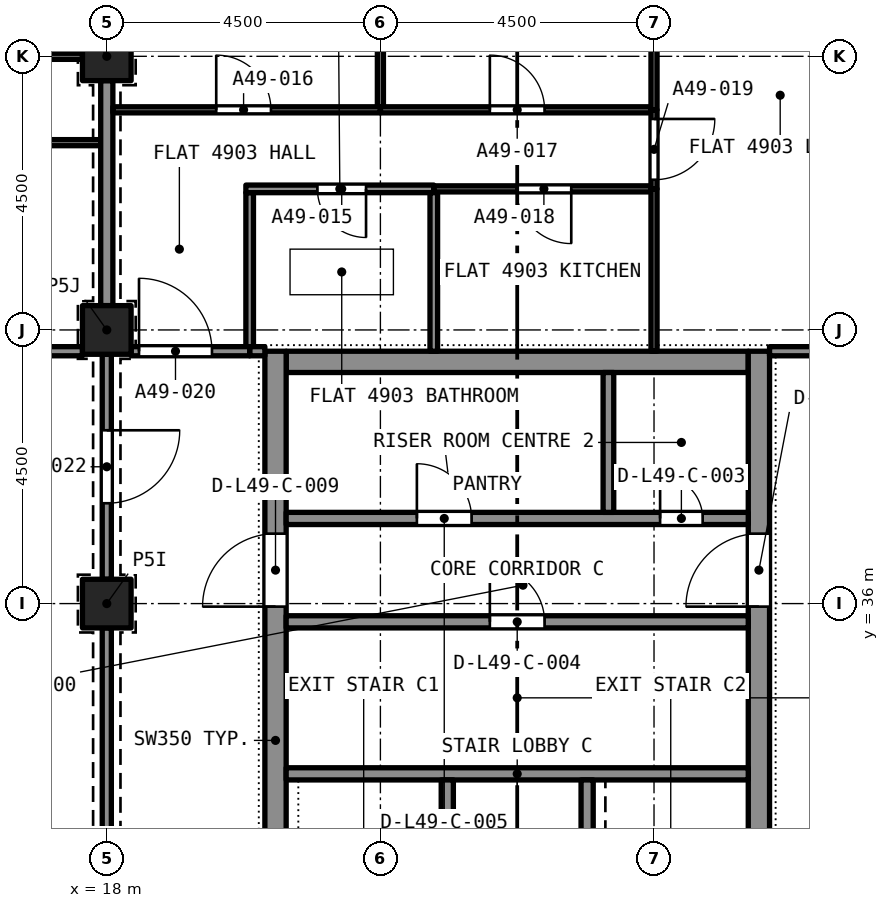
"""IFC4 building model, lengths in metres.
Left out: names, types, materials, properties, quantities, classifications, styles, units other than length and angle.
Written with IfcOpenShell. Run it as: python <this file> out.ifc"""

import sys

from ifc_helpers import new_model, si_unit, direction, frame, frame_2d, origin, origin_2d, place, context, subcontext, project, spatial, rectangle, extrude, element, fill, save


model = new_model("IFC4")
c1 = context("Model", 3, precision=1e-05, world=origin(), true_north=direction((0.0, 1.0)))
c2 = subcontext(c1, "Body", "Model", "MODEL_VIEW")
j1 = project(units=[si_unit("LENGTHUNIT", "METRE"), si_unit("PLANEANGLEUNIT", "RADIAN")], contexts=[c1])
p1 = place(None, origin())
s1 = spatial("IfcSite", under=j1, at=p1, CompositionType="ELEMENT")
p2 = place(p1, origin())
s2 = spatial("IfcBuilding", under=s1, at=p2, CompositionType="ELEMENT")
p3 = place(p2, frame((0.0, 0.0, 179.5)))
s3 = spatial("IfcBuildingStorey", under=s2, at=p3, CompositionType="ELEMENT", Elevation=179.5)
for number, where, z_axis, x_axis in (
    (1, (18.0, 36.0, 0.0), (0.0, 0.0, 1.0), (1.0, 0.0, 0.0)),
    (2, (18.0, 40.5, 0.0), (0.0, 0.0, 1.0), (1.0, 0.0, 0.0)),
    (3, (18.0, 45.0, 0.0), (0.0, 0.0, 1.0), (1.0, 0.0, 0.0)),
):
    element("IfcColumn", number, at=place(p3, frame(where, z_axis=z_axis, x_axis=x_axis)), inside=s3, PredefinedType="COLUMN", context=c2, shape_type="SweptSolid", body=[
        extrude(rectangle(XDim=0.8, YDim=0.8, at=origin_2d()), origin(), (0.0, 0.0, 1.0), 3.2),
    ])
p4 = place(p3, frame((20.95, 39.975, 0.0), z_axis=(0.0, 0.0, 1.0), x_axis=(1.0, 0.0, 0.0)))
e4 = element("IfcWall", 4, at=p4, inside=s3, PredefinedType="SOLIDWALL", context=c2, shape_type="SweptSolid", body=[
    extrude(rectangle(XDim=7.6, YDim=0.35, at=frame_2d((3.8, 0.0))), origin(), (0.0, 0.0, 1.0), 3.2),
])
p5 = place(p3, frame((20.775, 27.35, 0.0), z_axis=(0.0, 0.0, 1.0), x_axis=(0.0, 1.0, 0.0)))
e5 = element("IfcWall", 5, at=p5, inside=s3, PredefinedType="SOLIDWALL", context=c2, shape_type="SweptSolid", body=[
    extrude(rectangle(XDim=12.8, YDim=0.35, at=frame_2d((6.4, 0.0))), origin(), (0.0, 0.0, 1.0), 3.2),
])
p6 = place(p5, frame((8.6, 0.0, 0.0)))
e6 = element("IfcOpeningElement", 6, at=p6, cuts=e5, PredefinedType="OPENING", context=c2, shape_type="SweptSolid", body=[
    extrude(rectangle(XDim=1.2, YDim=2.1, at=frame_2d((0.6, 1.05))), frame((0.0, 0.185, 0.0), z_axis=(0.0, -1.0, 0.0), x_axis=(1.0, 0.0, 0.0)), (0.0, 0.0, 1.0), 0.37),
])
p7 = place(p3, frame((28.725, 27.35, 0.0), z_axis=(0.0, 0.0, 1.0), x_axis=(0.0, 1.0, 0.0)))
e7 = element("IfcWall", 7, at=p7, inside=s3, PredefinedType="SOLIDWALL", context=c2, shape_type="SweptSolid", body=[
    extrude(rectangle(XDim=12.8, YDim=0.35, at=frame_2d((6.4, 0.0))), origin(), (0.0, 0.0, 1.0), 3.2),
])
p8 = place(p7, frame((8.6, 0.0, 0.0)))
e8 = element("IfcOpeningElement", 8, at=p8, cuts=e7, PredefinedType="OPENING", context=c2, shape_type="SweptSolid", body=[
    extrude(rectangle(XDim=1.2, YDim=2.1, at=frame_2d((0.6, 1.05))), frame((0.0, 0.185, 0.0), z_axis=(0.0, -1.0, 0.0), x_axis=(1.0, 0.0, 0.0)), (0.0, 0.0, 1.0), 0.37),
])
p9 = place(p3, frame((13.5, 45.0, 0.0), z_axis=(0.0, 0.0, 1.0), x_axis=(1.0, 0.0, 0.0)))
e9 = element("IfcWall", 9, at=p9, inside=s3, PredefinedType="PARTITIONING", context=c2, shape_type="SweptSolid", body=[
    extrude(rectangle(XDim=4.1, YDim=0.1, at=frame_2d((2.05, 0.0))), origin(), (0.0, 0.0, 1.0), 2.9),
])
p10 = place(p9, frame((1.8, 0.0, 0.0)))
e10 = element("IfcOpeningElement", 10, at=p10, cuts=e9, PredefinedType="OPENING", context=c2, shape_type="SweptSolid", body=[
    extrude(rectangle(XDim=0.9, YDim=2.1, at=frame_2d((0.45, 1.05))), frame((0.0, 0.06, 0.0), z_axis=(0.0, -1.0, 0.0), x_axis=(1.0, 0.0, 0.0)), (0.0, 0.0, 1.0), 0.12),
])
p11 = place(p3, frame((17.9, 43.58, 0.0), z_axis=(0.0, 0.0, 1.0), x_axis=(-1.0, 0.0, 0.0)))
e11 = element("IfcWall", 11, at=p11, inside=s3, PredefinedType="PARTITIONING", context=c2, shape_type="SweptSolid", body=[
    extrude(rectangle(XDim=6.874, YDim=0.1, at=frame_2d((3.437, 0.0))), origin(), (0.0, 0.0, 1.0), 2.9),
])
p12 = place(p11, frame((2.937, 0.0, 0.0)))
e12 = element("IfcOpeningElement", 12, at=p12, cuts=e11, PredefinedType="OPENING", context=c2, shape_type="SweptSolid", body=[
    extrude(rectangle(XDim=0.9, YDim=2.1, at=frame_2d((0.45, 1.05))), frame((0.0, 0.06, 0.0), z_axis=(0.0, -1.0, 0.0), x_axis=(1.0, 0.0, 0.0)), (0.0, 0.0, 1.0), 0.12),
])
p13 = place(p3, frame((18.0, 40.9, 0.0), z_axis=(0.0, 0.0, 1.0), x_axis=(0.0, 1.0, 0.0)))
e13 = element("IfcWall", 13, at=p13, inside=s3, PredefinedType="PARTITIONING", context=c2, shape_type="SweptSolid", body=[
    extrude(rectangle(XDim=3.7, YDim=0.2, at=frame_2d((1.85, 0.0))), origin(), (0.0, 0.0, 1.0), 2.38),
])
p14 = place(p3, frame((13.15, 40.15, 0.0), z_axis=(0.0, 0.0, 1.0), x_axis=(1.0, 0.0, 0.0)))
e14 = element("IfcWall", 14, at=p14, inside=s3, PredefinedType="PARTITIONING", context=c2, shape_type="SweptSolid", body=[
    extrude(rectangle(XDim=4.45, YDim=0.15, at=frame_2d((2.225, 0.0))), origin(), (0.0, 0.0, 1.0), 2.9),
])
p15 = place(p3, frame((20.35, 40.225, 0.0), z_axis=(0.0, 0.0, 1.0), x_axis=(0.0, 1.0, 0.0)))
e15 = element("IfcWall", 15, at=p15, inside=s3, PredefinedType="PARTITIONING", context=c2, shape_type="SweptSolid", body=[
    extrude(rectangle(XDim=2.532, YDim=0.125, at=frame_2d((1.266, 0.0))), origin(), (0.0, 0.0, 1.0), 2.75),
])
p16 = place(p3, frame((23.378, 42.82, 0.0), z_axis=(0.0, 0.0, 1.0), x_axis=(-1.0, 0.0, 0.0)))
e16 = element("IfcWall", 16, at=p16, inside=s3, PredefinedType="PARTITIONING", context=c2, shape_type="SweptSolid", body=[
    extrude(rectangle(XDim=3.09, YDim=0.125, at=frame_2d((1.545, 0.0))), origin(), (0.0, 0.0, 1.0), 2.75),
])
p17 = place(p16, frame((1.114, 0.0, 0.0)))
e17 = element("IfcOpeningElement", 17, at=p17, cuts=e16, PredefinedType="OPENING", context=c2, shape_type="SweptSolid", body=[
    extrude(rectangle(XDim=0.8, YDim=2.1, at=frame_2d((0.4, 1.05))), frame((0.0, 0.073, 0.0), z_axis=(0.0, -1.0, 0.0), x_axis=(1.0, 0.0, 0.0)), (0.0, 0.0, 1.0), 0.145),
])
p18 = place(p3, frame((23.378, 40.15, 0.0), z_axis=(0.0, 0.0, 1.0), x_axis=(0.0, 1.0, 0.0)))
e18 = element("IfcWall", 18, at=p18, inside=s3, PredefinedType="PARTITIONING", context=c2, shape_type="SweptSolid", body=[
    extrude(rectangle(XDim=2.608, YDim=0.125, at=frame_2d((1.304, 0.0))), origin(), (0.0, 0.0, 1.0), 2.75),
])
p19 = place(p3, frame((20.35, 40.15, 0.0), z_axis=(0.0, 0.0, 1.0), x_axis=(1.0, 0.0, 0.0)))
e19 = element("IfcWall", 19, at=p19, inside=s3, PredefinedType="PARTITIONING", context=c2, shape_type="SweptSolid", body=[
    extrude(rectangle(XDim=0.25, YDim=0.15, at=frame_2d((0.125, 0.0))), origin(), (0.0, 0.0, 1.0), 2.75),
])
p20 = place(p3, frame((22.5, 44.17, 0.0), z_axis=(0.0, 0.0, 1.0), x_axis=(0.0, 1.0, 0.0)))
e20 = element("IfcWall", 20, at=p20, inside=s3, PredefinedType="PARTITIONING", context=c2, shape_type="SweptSolid", body=[
    extrude(rectangle(XDim=4.93, YDim=0.1, at=frame_2d((2.465, 0.0))), origin(), (0.0, 0.0, 1.0), 2.75),
])
p21 = place(p3, frame((18.1, 44.12, 0.0), z_axis=(0.0, 0.0, 1.0), x_axis=(1.0, 0.0, 0.0)))
e21 = element("IfcWall", 21, at=p21, inside=s3, PredefinedType="PARTITIONING", context=c2, shape_type="SweptSolid", body=[
    extrude(rectangle(XDim=4.4, YDim=0.1, at=frame_2d((2.2, 0.0))), origin(), (0.0, 0.0, 1.0), 2.75),
])
p22 = place(p21, frame((1.7, 0.0, 0.0)))
e22 = element("IfcOpeningElement", 22, at=p22, cuts=e21, PredefinedType="OPENING", context=c2, shape_type="SweptSolid", body=[
    extrude(rectangle(XDim=0.9, YDim=2.1, at=frame_2d((0.45, 1.05))), frame((0.0, 0.06, 0.0), z_axis=(0.0, -1.0, 0.0), x_axis=(1.0, 0.0, 0.0)), (0.0, 0.0, 1.0), 0.12),
])
p23 = place(p3, frame((22.5, 44.12, 0.0), z_axis=(0.0, 0.0, 1.0), x_axis=(1.0, 0.0, 0.0)))
e23 = element("IfcWall", 23, at=p23, inside=s3, PredefinedType="PARTITIONING", context=c2, shape_type="SweptSolid", body=[
    extrude(rectangle(XDim=4.45, YDim=0.1, at=frame_2d((2.225, 0.0))), origin(), (0.0, 0.0, 1.0), 2.75),
])
p24 = place(p23, frame((1.8, 0.0, 0.0)))
e24 = element("IfcOpeningElement", 24, at=p24, cuts=e23, PredefinedType="OPENING", context=c2, shape_type="SweptSolid", body=[
    extrude(rectangle(XDim=0.9, YDim=2.1, at=frame_2d((0.45, 1.05))), frame((0.0, 0.06, 0.0), z_axis=(0.0, -1.0, 0.0), x_axis=(1.0, 0.0, 0.0)), (0.0, 0.0, 1.0), 0.12),
])
p25 = place(p3, frame((27.0, 44.12, 0.0), z_axis=(0.0, 0.0, 1.0), x_axis=(0.0, 1.0, 0.0)))
e25 = element("IfcWall", 25, at=p25, inside=s3, PredefinedType="PARTITIONING", context=c2, shape_type="SweptSolid", body=[
    extrude(rectangle(XDim=4.947, YDim=0.1, at=frame_2d((2.474, 0.0))), origin(), (0.0, 0.0, 1.0), 2.75),
])
p26 = place(p3, frame((26.95, 42.82, 0.0), z_axis=(0.0, 0.0, 1.0), x_axis=(-1.0, 0.0, 0.0)))
e26 = element("IfcWall", 26, at=p26, inside=s3, PredefinedType="PARTITIONING", context=c2, shape_type="SweptSolid", body=[
    extrude(rectangle(XDim=3.572, YDim=0.1, at=frame_2d((1.786, 0.0))), origin(), (0.0, 0.0, 1.0), 2.75),
])
p27 = place(p26, frame((1.311, 0.0, 0.0)))
e27 = element("IfcOpeningElement", 27, at=p27, cuts=e26, PredefinedType="OPENING", context=c2, shape_type="SweptSolid", body=[
    extrude(rectangle(XDim=0.9, YDim=2.1, at=frame_2d((0.45, 1.05))), frame((0.0, 0.06, 0.0), z_axis=(0.0, -1.0, 0.0), x_axis=(1.0, 0.0, 0.0)), (0.0, 0.0, 1.0), 0.12),
])
p28 = place(p3, frame((27.0, 44.12, 0.0), z_axis=(0.0, 0.0, 1.0), x_axis=(0.0, -1.0, 0.0)))
e28 = element("IfcWall", 28, at=p28, inside=s3, PredefinedType="PARTITIONING", context=c2, shape_type="SweptSolid", body=[
    extrude(rectangle(XDim=1.3, YDim=0.1, at=frame_2d((0.65, 0.0))), origin(), (0.0, 0.0, 1.0), 2.75),
])
p29 = place(p28, frame((0.15, 0.0, 0.0)))
e29 = element("IfcOpeningElement", 29, at=p29, cuts=e28, PredefinedType="OPENING", context=c2, shape_type="SweptSolid", body=[
    extrude(rectangle(XDim=1.0, YDim=2.1, at=frame_2d((0.5, 1.05))), frame((0.0, 0.06, 0.0), z_axis=(0.0, -1.0, 0.0), x_axis=(1.0, 0.0, 0.0)), (0.0, 0.0, 1.0), 0.12),
])
p30 = place(p3, frame((18.4, 40.15, 0.0), z_axis=(0.0, 0.0, 1.0), x_axis=(1.0, 0.0, 0.0)))
e30 = element("IfcWall", 30, at=p30, inside=s3, PredefinedType="PARTITIONING", context=c2, shape_type="SweptSolid", body=[
    extrude(rectangle(XDim=1.95, YDim=0.15, at=frame_2d((0.975, 0.0))), origin(), (0.0, 0.0, 1.0), 2.75),
])
p31 = place(p30, frame((0.13, 0.0, 0.0)))
e31 = element("IfcOpeningElement", 31, at=p31, cuts=e30, PredefinedType="OPENING", context=c2, shape_type="SweptSolid", body=[
    extrude(rectangle(XDim=1.2, YDim=2.4, at=frame_2d((0.6, 1.2))), frame((0.0, 0.085, 0.0), z_axis=(0.0, -1.0, 0.0), x_axis=(1.0, 0.0, 0.0)), (0.0, 0.0, 1.0), 0.17),
])
p32 = place(p3, frame((27.0, 40.15, 0.0), z_axis=(0.0, 0.0, 1.0), x_axis=(0.0, 1.0, 0.0)))
e32 = element("IfcWall", 32, at=p32, inside=s3, PredefinedType="PARTITIONING", context=c2, shape_type="SweptSolid", body=[
    extrude(rectangle(XDim=2.67, YDim=0.1, at=frame_2d((1.335, 0.0))), origin(), (0.0, 0.0, 1.0), 2.75),
])
p33 = place(p3, frame((28.9, 40.15, 0.0), z_axis=(0.0, 0.0, 1.0), x_axis=(1.0, 0.0, 0.0)))
e33 = element("IfcWall", 33, at=p33, inside=s3, PredefinedType="PARTITIONING", context=c2, shape_type="SweptSolid", body=[
    extrude(rectangle(XDim=2.2, YDim=0.15, at=frame_2d((1.1, 0.0))), origin(), (0.0, 0.0, 1.0), 2.75),
])
p34 = place(p3, frame((18.0, 31.9, 0.0), z_axis=(0.0, 0.0, 1.0), x_axis=(0.0, 1.0, 0.0)))
e34 = element("IfcWall", 34, at=p34, inside=s3, PredefinedType="PARTITIONING", context=c2, shape_type="SweptSolid", body=[
    extrude(rectangle(XDim=3.7, YDim=0.15, at=frame_2d((1.85, 0.0))), origin(), (0.0, 0.0, 1.0), 2.38),
])
p35 = place(p3, frame((18.0, 40.1, 0.0), z_axis=(0.0, 0.0, 1.0), x_axis=(0.0, -1.0, 0.0)))
e35 = element("IfcWall", 35, at=p35, inside=s3, PredefinedType="PARTITIONING", context=c2, shape_type="SweptSolid", body=[
    extrude(rectangle(XDim=3.7, YDim=0.15, at=frame_2d((1.85, 0.0))), origin(), (0.0, 0.0, 1.0), 2.38),
])
p36 = place(p35, frame((1.25, 0.0, 0.0)))
e36 = element("IfcOpeningElement", 36, at=p36, cuts=e35, PredefinedType="OPENING", context=c2, shape_type="SweptSolid", body=[
    extrude(rectangle(XDim=1.2, YDim=2.1, at=frame_2d((0.6, 1.05))), frame((0.0, 0.085, 0.0), z_axis=(0.0, -1.0, 0.0), x_axis=(1.0, 0.0, 0.0)), (0.0, 0.0, 1.0), 0.17),
])
p37 = place(p3, frame((20.95, 33.2, 0.0), z_axis=(0.0, 0.0, 1.0), x_axis=(1.0, 0.0, 0.0)))
e37 = element("IfcWall", 37, at=p37, inside=s3, PredefinedType="SOLIDWALL", context=c2, shape_type="SweptSolid", body=[
    extrude(rectangle(XDim=7.6, YDim=0.2, at=frame_2d((3.8, 0.0))), origin(), (0.0, 0.0, 1.0), 2.9),
])
p38 = place(p3, frame((20.95, 35.7, 0.0), z_axis=(0.0, 0.0, 1.0), x_axis=(1.0, 0.0, 0.0)))
e38 = element("IfcWall", 38, at=p38, inside=s3, PredefinedType="SOLIDWALL", context=c2, shape_type="SweptSolid", body=[
    extrude(rectangle(XDim=7.6, YDim=0.2, at=frame_2d((3.8, 0.0))), origin(), (0.0, 0.0, 1.0), 2.9),
])
p39 = place(p38, frame((3.35, 0.0, 0.0)))
e39 = element("IfcOpeningElement", 39, at=p39, cuts=e38, PredefinedType="OPENING", context=c2, shape_type="SweptSolid", body=[
    extrude(rectangle(XDim=0.9, YDim=2.1, at=frame_2d((0.45, 1.05))), frame((0.0, 0.11, 0.0), z_axis=(0.0, -1.0, 0.0), x_axis=(1.0, 0.0, 0.0)), (0.0, 0.0, 1.0), 0.22),
])
p40 = place(p3, frame((20.95, 37.4, 0.0), z_axis=(0.0, 0.0, 1.0), x_axis=(1.0, 0.0, 0.0)))
e40 = element("IfcWall", 40, at=p40, inside=s3, PredefinedType="SOLIDWALL", context=c2, shape_type="SweptSolid", body=[
    extrude(rectangle(XDim=7.6, YDim=0.2, at=frame_2d((3.8, 0.0))), origin(), (0.0, 0.0, 1.0), 2.9),
])
p41 = place(p40, frame((6.15, 0.0, 0.0)))
e41 = element("IfcOpeningElement", 41, at=p41, cuts=e40, PredefinedType="OPENING", context=c2, shape_type="SweptSolid", body=[
    extrude(rectangle(XDim=0.7, YDim=2.1, at=frame_2d((0.35, 1.05))), frame((0.0, 0.11, 0.0), z_axis=(0.0, -1.0, 0.0), x_axis=(1.0, 0.0, 0.0)), (0.0, 0.0, 1.0), 0.22),
])
p42 = place(p40, frame((2.15, 0.0, 0.0)))
e42 = element("IfcOpeningElement", 42, at=p42, cuts=e40, PredefinedType="OPENING", context=c2, shape_type="SweptSolid", body=[
    extrude(rectangle(XDim=0.9, YDim=2.1, at=frame_2d((0.45, 1.05))), frame((0.0, 0.11, 0.0), z_axis=(0.0, -1.0, 0.0), x_axis=(1.0, 0.0, 0.0)), (0.0, 0.0, 1.0), 0.22),
])
p43 = place(p3, frame((23.6, 27.7, 0.0), z_axis=(0.0, 0.0, 1.0), x_axis=(0.0, 1.0, 0.0)))
e43 = element("IfcWall", 43, at=p43, inside=s3, PredefinedType="SOLIDWALL", context=c2, shape_type="SweptSolid", body=[
    extrude(rectangle(XDim=5.4, YDim=0.2, at=frame_2d((2.7, 0.0))), origin(), (0.0, 0.0, 1.0), 2.9),
])
p44 = place(p43, frame((0.2, 0.0, 0.0)))
e44 = element("IfcOpeningElement", 44, at=p44, cuts=e43, PredefinedType="OPENING", context=c2, shape_type="SweptSolid", body=[
    extrude(rectangle(XDim=0.9, YDim=2.1, at=frame_2d((0.45, 1.05))), frame((0.0, 0.11, 0.0), z_axis=(0.0, -1.0, 0.0), x_axis=(1.0, 0.0, 0.0)), (0.0, 0.0, 1.0), 0.22),
])
p45 = place(p3, frame((25.9, 27.7, 0.0), z_axis=(0.0, 0.0, 1.0), x_axis=(0.0, 1.0, 0.0)))
e45 = element("IfcWall", 45, at=p45, inside=s3, PredefinedType="SOLIDWALL", context=c2, shape_type="SweptSolid", body=[
    extrude(rectangle(XDim=5.4, YDim=0.2, at=frame_2d((2.7, 0.0))), origin(), (0.0, 0.0, 1.0), 2.9),
])
p46 = place(p45, frame((0.2, 0.0, 0.0)))
e46 = element("IfcOpeningElement", 46, at=p46, cuts=e45, PredefinedType="OPENING", context=c2, shape_type="SweptSolid", body=[
    extrude(rectangle(XDim=0.9, YDim=2.1, at=frame_2d((0.45, 1.05))), frame((0.0, 0.11, 0.0), z_axis=(0.0, -1.0, 0.0), x_axis=(1.0, 0.0, 0.0)), (0.0, 0.0, 1.0), 0.22),
])
p47 = place(p3, frame((26.25, 37.5, 0.0), z_axis=(0.0, 0.0, 1.0), x_axis=(0.0, 1.0, 0.0)))
e47 = element("IfcWall", 47, at=p47, inside=s3, PredefinedType="SOLIDWALL", context=c2, shape_type="SweptSolid", body=[
    extrude(rectangle(XDim=2.3, YDim=0.175, at=frame_2d((1.15, 0.0))), origin(), (0.0, 0.0, 1.0), 2.9),
])
p48 = place(p17, origin())
e48 = element("IfcDoor", 48, at=p48, inside=s3, OperationType="SINGLE_SWING_LEFT", PredefinedType="DOOR", context=c2, shape_type="SweptSolid", body=[
    extrude(rectangle(XDim=0.8, YDim=2.1, at=frame_2d((0.4, 1.05))), frame((0.0, 0.025, 0.0), z_axis=(0.0, -1.0, 0.0), x_axis=(1.0, 0.0, 0.0)), (0.0, 0.0, 1.0), 0.05),
])
fill(e17, e48)
p49 = place(p22, origin())
e49 = element("IfcDoor", 49, at=p49, inside=s3, OperationType="SINGLE_SWING_LEFT", PredefinedType="DOOR", context=c2, shape_type="SweptSolid", body=[
    extrude(rectangle(XDim=0.9, YDim=2.1, at=frame_2d((0.45, 1.05))), frame((0.0, 0.025, 0.0), z_axis=(0.0, -1.0, 0.0), x_axis=(1.0, 0.0, 0.0)), (0.0, 0.0, 1.0), 0.05),
])
fill(e22, e49)
p50 = place(p24, origin())
e50 = element("IfcDoor", 50, at=p50, inside=s3, OperationType="SINGLE_SWING_RIGHT", PredefinedType="DOOR", context=c2, shape_type="SweptSolid", body=[
    extrude(rectangle(XDim=0.9, YDim=2.1, at=frame_2d((0.45, 1.05))), frame((0.0, 0.025, 0.0), z_axis=(0.0, -1.0, 0.0), x_axis=(1.0, 0.0, 0.0)), (0.0, 0.0, 1.0), 0.05),
])
fill(e24, e50)
p51 = place(p27, origin())
e51 = element("IfcDoor", 51, at=p51, inside=s3, OperationType="SINGLE_SWING_LEFT", PredefinedType="DOOR", context=c2, shape_type="SweptSolid", body=[
    extrude(rectangle(XDim=0.9, YDim=2.1, at=frame_2d((0.45, 1.05))), frame((0.0, 0.025, 0.0), z_axis=(0.0, -1.0, 0.0), x_axis=(1.0, 0.0, 0.0)), (0.0, 0.0, 1.0), 0.05),
])
fill(e27, e51)
p52 = place(p29, origin())
e52 = element("IfcDoor", 52, at=p52, inside=s3, OperationType="SINGLE_SWING_RIGHT", PredefinedType="DOOR", context=c2, shape_type="SweptSolid", body=[
    extrude(rectangle(XDim=1.0, YDim=2.1, at=frame_2d((0.5, 1.05))), frame((0.0, 0.025, 0.0), z_axis=(0.0, -1.0, 0.0), x_axis=(1.0, 0.0, 0.0)), (0.0, 0.0, 1.0), 0.05),
])
fill(e29, e52)
p53 = place(p31, origin())
e53 = element("IfcDoor", 53, at=p53, inside=s3, OperationType="SINGLE_SWING_LEFT", PredefinedType="DOOR", context=c2, shape_type="SweptSolid", body=[
    extrude(rectangle(XDim=1.2, YDim=2.4, at=frame_2d((0.6, 1.2))), frame((0.0, 0.025, 0.0), z_axis=(0.0, -1.0, 0.0), x_axis=(1.0, 0.0, 0.0)), (0.0, 0.0, 1.0), 0.05),
])
fill(e31, e53)
p54 = place(p36, origin())
e54 = element("IfcDoor", 54, at=p54, inside=s3, OperationType="SINGLE_SWING_LEFT", PredefinedType="DOOR", context=c2, shape_type="SweptSolid", body=[
    extrude(rectangle(XDim=1.2, YDim=2.1, at=frame_2d((0.6, 1.05))), frame((0.0, 0.025, 0.0), z_axis=(0.0, -1.0, 0.0), x_axis=(1.0, 0.0, 0.0)), (0.0, 0.0, 1.0), 0.05),
])
fill(e36, e54)
p55 = place(p41, origin())
e55 = element("IfcDoor", 55, at=p55, inside=s3, OperationType="SINGLE_SWING_LEFT", PredefinedType="DOOR", context=c2, shape_type="SweptSolid", body=[
    extrude(rectangle(XDim=0.7, YDim=2.1, at=frame_2d((0.35, 1.05))), frame((0.0, 0.025, 0.0), z_axis=(0.0, -1.0, 0.0), x_axis=(1.0, 0.0, 0.0)), (0.0, 0.0, 1.0), 0.05),
])
fill(e41, e55)
p56 = place(p39, origin())
e56 = element("IfcDoor", 56, at=p56, inside=s3, OperationType="SINGLE_SWING_LEFT", PredefinedType="DOOR", context=c2, shape_type="SweptSolid", body=[
    extrude(rectangle(XDim=0.9, YDim=2.1, at=frame_2d((0.45, 1.05))), frame((0.0, 0.025, 0.0), z_axis=(0.0, -1.0, 0.0), x_axis=(1.0, 0.0, 0.0)), (0.0, 0.0, 1.0), 0.05),
])
fill(e39, e56)
p57 = place(p42, origin())
e57 = element("IfcDoor", 57, at=p57, inside=s3, OperationType="SINGLE_SWING_LEFT", PredefinedType="DOOR", context=c2, shape_type="SweptSolid", body=[
    extrude(rectangle(XDim=0.9, YDim=2.1, at=frame_2d((0.45, 1.05))), frame((0.0, 0.025, 0.0), z_axis=(0.0, -1.0, 0.0), x_axis=(1.0, 0.0, 0.0)), (0.0, 0.0, 1.0), 0.05),
])
fill(e42, e57)
p58 = place(p6, origin())
e58 = element("IfcDoor", 58, at=p58, inside=s3, OperationType="SINGLE_SWING_LEFT", PredefinedType="DOOR", context=c2, shape_type="SweptSolid", body=[
    extrude(rectangle(XDim=1.2, YDim=2.1, at=frame_2d((0.6, 1.05))), frame((0.0, 0.025, 0.0), z_axis=(0.0, -1.0, 0.0), x_axis=(1.0, 0.0, 0.0)), (0.0, 0.0, 1.0), 0.05),
])
fill(e6, e58)
p59 = place(p8, origin())
e59 = element("IfcDoor", 59, at=p59, inside=s3, OperationType="SINGLE_SWING_LEFT", PredefinedType="DOOR", context=c2, shape_type="SweptSolid", body=[
    extrude(rectangle(XDim=1.2, YDim=2.1, at=frame_2d((0.6, 1.05))), frame((0.0, 0.025, 0.0), z_axis=(0.0, -1.0, 0.0), x_axis=(1.0, 0.0, 0.0)), (0.0, 0.0, 1.0), 0.05),
])
fill(e8, e59)
save(model, sys.argv[1])
